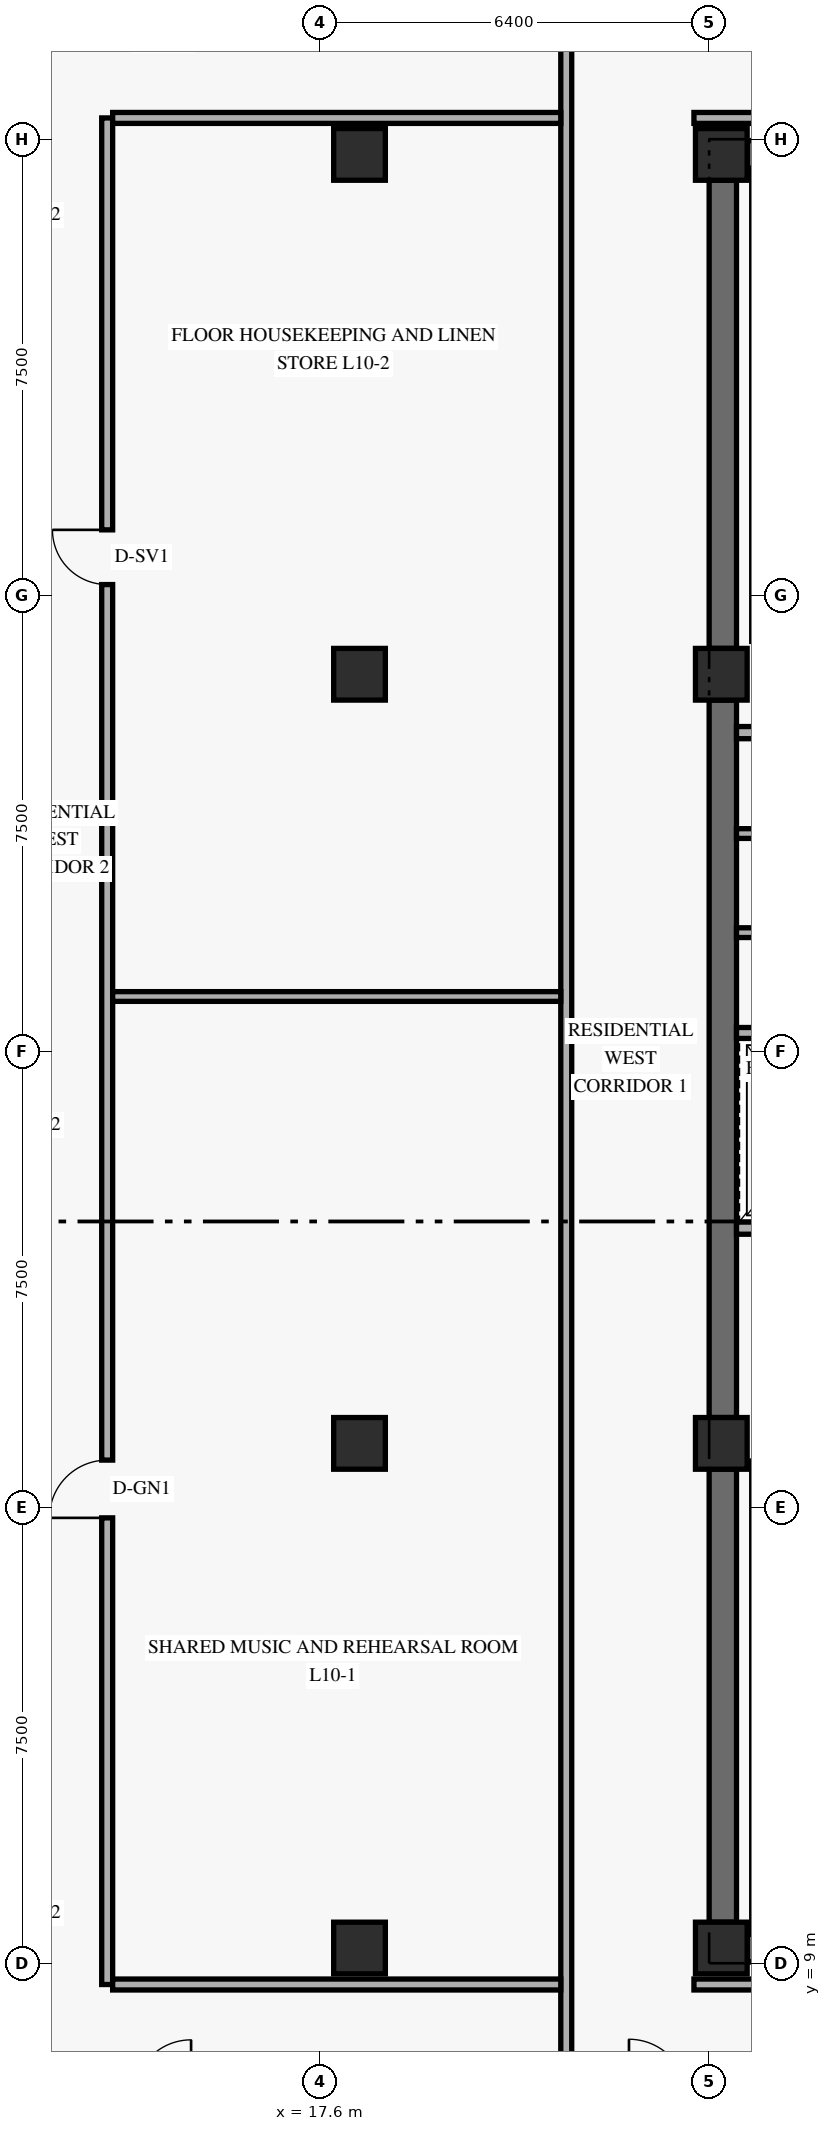
"""IFC4 building model, lengths in metres.
Left out: names, types, materials, properties, quantities, classifications, styles, units other than length and angle.
Written with IfcOpenShell. Run it as: python <this file> out.ifc"""

import sys

from ifc_helpers import new_model, si_unit, direction, frame, frame_2d, origin, origin_2d, place, context, subcontext, project, spatial, rectangle, extrude, element, fill, save


model = new_model("IFC4")
c1 = context("Model", 3, precision=1e-05, world=origin(), true_north=direction((0.0, 1.0)))
c2 = subcontext(c1, "Body", "Model", "MODEL_VIEW")
j1 = project(units=[si_unit("LENGTHUNIT", "METRE"), si_unit("PLANEANGLEUNIT", "RADIAN")], contexts=[c1])
p1 = place(None, origin())
s1 = spatial("IfcSite", under=j1, at=p1, CompositionType="ELEMENT")
p2 = place(p1, origin())
s2 = spatial("IfcBuilding", under=s1, at=p2, CompositionType="ELEMENT")
p3 = place(p2, frame((0.0, 0.0, 42.0)))
s3 = spatial("IfcBuildingStorey", under=s2, at=p3, CompositionType="ELEMENT", Elevation=42.0)
p4 = place(p3, frame((24.225, 9.675, 0.0), z_axis=(0.0, 0.0, 1.0), x_axis=(0.0, 1.0, 0.0)))
e1 = element("IfcWall", 1, at=p4, inside=s3, PredefinedType="SHEAR", context=c2, shape_type="SweptSolid", body=[
    extrude(rectangle(XDim=7.45, YDim=0.45, at=frame_2d((3.725, 0.0))), origin(), (0.0, 0.0, 1.0), 2.667),
])
p5 = place(p3, frame((24.225, 17.975, 0.0), z_axis=(0.0, 0.0, 1.0), x_axis=(0.0, 1.0, 0.0)))
e2 = element("IfcWall", 2, at=p5, inside=s3, PredefinedType="SHEAR", context=c2, shape_type="SweptSolid", body=[
    extrude(rectangle(XDim=11.8, YDim=0.45, at=frame_2d((5.9, 0.0))), origin(), (0.0, 0.0, 1.0), 2.667),
])
p6 = place(p3, frame((24.225, 30.625, 0.0), z_axis=(0.0, 0.0, 1.0), x_axis=(0.0, 1.0, 0.0)))
e3 = element("IfcWall", 3, at=p6, inside=s3, PredefinedType="SHEAR", context=c2, shape_type="SweptSolid", body=[
    extrude(rectangle(XDim=7.7, YDim=0.45, at=frame_2d((3.85, 0.0))), origin(), (0.0, 0.0, 1.0), 2.667),
])
for number, where, z_axis, x_axis in (
    (4, (24.625, 9.25, 0.0), (0.0, 0.0, 1.0), (1.0, 0.0, 0.0)),
    (5, (24.625, 38.75, 0.0), (0.0, 0.0, 1.0), (1.0, 0.0, 0.0)),
):
    element("IfcWall", number, at=place(p3, frame(where, z_axis=z_axis, x_axis=x_axis)), inside=s3, PredefinedType="SHEAR", context=c2, shape_type="SweptSolid", body=[
        extrude(rectangle(XDim=10.15, YDim=0.45, at=frame_2d((5.075, 0.0))), origin(), (0.0, 0.0, 1.0), 3.36),
    ])
for number, where, z_axis, x_axis in (
    (6, (18.25, 9.25, 0.0), (0.0, 0.0, 1.0), (1.0, 0.0, 0.0)),
    (7, (18.25, 17.55, 0.0), (0.0, 0.0, 1.0), (1.0, 0.0, 0.0)),
    (8, (18.25, 30.2, 0.0), (0.0, 0.0, 1.0), (1.0, 0.0, 0.0)),
    (9, (18.25, 38.75, 0.0), (0.0, 0.0, 1.0), (1.0, 0.0, 0.0)),
    (10, (24.2, 9.25, 0.0), (0.0, 0.0, 1.0), (1.0, 0.0, 0.0)),
    (11, (24.2, 17.55, 0.0), (0.0, 0.0, 1.0), (1.0, 0.0, 0.0)),
    (12, (24.2, 30.2, 0.0), (0.0, 0.0, 1.0), (1.0, 0.0, 0.0)),
    (13, (24.2, 38.75, 0.0), (0.0, 0.0, 1.0), (1.0, 0.0, 0.0)),
):
    element("IfcColumn", number, at=place(p3, frame(where, z_axis=z_axis, x_axis=x_axis)), inside=s3, PredefinedType="COLUMN", context=c2, shape_type="SweptSolid", body=[
        extrude(rectangle(XDim=0.85, YDim=0.85, at=origin_2d()), origin(), (0.0, 0.0, 1.0), 3.6),
    ])
p7 = place(p3, frame((24.45, 21.09, 0.0), z_axis=(0.0, 0.0, 1.0), x_axis=(1.0, 0.0, 0.0)))
e14 = element("IfcWall", 14, at=p7, inside=s3, PredefinedType="STANDARD", context=c2, shape_type="SweptSolid", body=[
    extrude(rectangle(XDim=6.83, YDim=0.2, at=frame_2d((3.415, 0.0))), origin(), (0.0, 0.0, 1.0), 3.36),
])
p8 = place(p7, frame((0.72, 0.0, 0.0)))
e15 = element("IfcOpeningElement", 15, at=p8, cuts=e14, PredefinedType="OPENING", context=c2, shape_type="SweptSolid", body=[
    extrude(rectangle(XDim=1.1, YDim=2.2, at=frame_2d((0.55, 1.1))), frame((0.0, 0.11, 0.0), z_axis=(0.0, -1.0, 0.0), x_axis=(1.0, 0.0, 0.0)), (0.0, 0.0, 1.0), 0.22),
])
p9 = place(p7, frame((3.32, 0.0, 0.0)))
e16 = element("IfcOpeningElement", 16, at=p9, cuts=e14, PredefinedType="OPENING", context=c2, shape_type="SweptSolid", body=[
    extrude(rectangle(XDim=1.1, YDim=2.2, at=frame_2d((0.55, 1.1))), frame((0.0, 0.11, 0.0), z_axis=(0.0, -1.0, 0.0), x_axis=(1.0, 0.0, 0.0)), (0.0, 0.0, 1.0), 0.22),
])
p10 = place(p3, frame((24.45, 24.3, 0.0), z_axis=(0.0, 0.0, 1.0), x_axis=(1.0, 0.0, 0.0)))
e17 = element("IfcWall", 17, at=p10, inside=s3, PredefinedType="STANDARD", context=c2, shape_type="SweptSolid", body=[
    extrude(rectangle(XDim=6.83, YDim=0.18, at=frame_2d((3.415, 0.0))), origin(), (0.0, 0.0, 1.0), 3.36),
])
p11 = place(p3, frame((24.45, 29.24, 0.0), z_axis=(0.0, 0.0, 1.0), x_axis=(1.0, 0.0, 0.0)))
e18 = element("IfcWall", 18, at=p11, inside=s3, PredefinedType="STANDARD", context=c2, shape_type="SweptSolid", body=[
    extrude(rectangle(XDim=3.65, YDim=0.2, at=frame_2d((1.825, 0.0))), origin(), (0.0, 0.0, 1.0), 3.36),
])
for number, where, z_axis, x_axis in (
    (19, (24.45, 25.95, 0.0), (0.0, 0.0, 1.0), (1.0, 0.0, 0.0)),
    (20, (24.45, 27.58, 0.0), (0.0, 0.0, 1.0), (1.0, 0.0, 0.0)),
):
    element("IfcWall", number, at=place(p3, frame(where, z_axis=z_axis, x_axis=x_axis)), inside=s3, PredefinedType="PARTITIONING", context=c2, shape_type="SweptSolid", body=[
        extrude(rectangle(XDim=3.55, YDim=0.16, at=frame_2d((1.775, 0.0))), origin(), (0.0, 0.0, 1.0), 3.36),
    ])
p12 = place(p3, frame((21.65, 6.8, 0.0), z_axis=(0.0, 0.0, 1.0), x_axis=(0.0, 1.0, 0.0)))
e21 = element("IfcWall", 21, at=p12, inside=s3, PredefinedType="STANDARD", context=c2, shape_type="SweptSolid", body=[
    extrude(rectangle(XDim=34.4, YDim=0.18, at=frame_2d((17.2, 0.0))), origin(), (0.0, 0.0, 1.0), 2.649),
])
for number, where, z_axis, x_axis in (
    (22, (23.75, 8.65, 0.0), (0.0, 0.0, 1.0), (1.0, 0.0, 0.0)),
    (23, (23.75, 39.35, 0.0), (0.0, 0.0, 1.0), (1.0, 0.0, 0.0)),
):
    element("IfcWall", number, at=place(p3, frame(where, z_axis=z_axis, x_axis=x_axis)), inside=s3, PredefinedType="STANDARD", context=c2, shape_type="SweptSolid", body=[
        extrude(rectangle(XDim=11.67, YDim=0.18, at=frame_2d((5.835, 0.0))), origin(), (0.0, 0.0, 1.0), 2.649),
    ])
p13 = place(p3, frame((14.1, 8.65, 0.0), z_axis=(0.0, 0.0, 1.0), x_axis=(0.0, 1.0, 0.0)))
e24 = element("IfcWall", 24, at=p13, inside=s3, PredefinedType="STANDARD", context=c2, shape_type="SweptSolid", body=[
    extrude(rectangle(XDim=30.7, YDim=0.18, at=frame_2d((15.35, 0.0))), origin(), (0.0, 0.0, 1.0), 2.649),
])
p14 = place(p13, frame((7.675, 0.0, 0.0)))
e25 = element("IfcOpeningElement", 25, at=p14, cuts=e24, PredefinedType="OPENING", context=c2, shape_type="SweptSolid", body=[
    extrude(rectangle(XDim=0.95, YDim=2.15, at=frame_2d((0.475, 1.075))), frame((0.0, 0.1, 0.0), z_axis=(0.0, -1.0, 0.0), x_axis=(1.0, 0.0, 0.0)), (0.0, 0.0, 1.0), 0.2),
])
p15 = place(p13, frame((23.025, 0.0, 0.0)))
e26 = element("IfcOpeningElement", 26, at=p15, cuts=e24, PredefinedType="OPENING", context=c2, shape_type="SweptSolid", body=[
    extrude(rectangle(XDim=0.9, YDim=2.1, at=frame_2d((0.45, 1.05))), frame((0.0, 0.1, 0.0), z_axis=(0.0, -1.0, 0.0), x_axis=(1.0, 0.0, 0.0)), (0.0, 0.0, 1.0), 0.2),
])
for number, where, z_axis, x_axis in (
    (27, (14.19, 8.65, 0.0), (0.0, 0.0, 1.0), (1.0, 0.0, 0.0)),
    (28, (14.19, 39.35, 0.0), (0.0, 0.0, 1.0), (1.0, 0.0, 0.0)),
):
    element("IfcWall", number, at=place(p3, frame(where, z_axis=z_axis, x_axis=x_axis)), inside=s3, PredefinedType="STANDARD", context=c2, shape_type="SweptSolid", body=[
        extrude(rectangle(XDim=7.37, YDim=0.18, at=frame_2d((3.685, 0.0))), origin(), (0.0, 0.0, 1.0), 2.649),
    ])
p16 = place(p3, frame((14.19, 24.9, 0.0), z_axis=(0.0, 0.0, 1.0), x_axis=(1.0, 0.0, 0.0)))
e29 = element("IfcWall", 29, at=p16, inside=s3, PredefinedType="PARTITIONING", context=c2, shape_type="SweptSolid", body=[
    extrude(rectangle(XDim=7.37, YDim=0.16, at=frame_2d((3.685, 0.0))), origin(), (0.0, 0.0, 1.0), 2.649),
])
p17 = place(p14, origin())
e30 = element("IfcDoor", 30, at=p17, inside=s3, OperationType="SINGLE_SWING_LEFT", PredefinedType="DOOR", context=c2, shape_type="SweptSolid", body=[
    extrude(rectangle(XDim=0.95, YDim=2.15, at=frame_2d((0.475, 1.075))), frame((0.0, 0.025, 0.0), z_axis=(0.0, -1.0, 0.0), x_axis=(1.0, 0.0, 0.0)), (0.0, 0.0, 1.0), 0.05),
])
fill(e25, e30)
p18 = place(p15, origin())
e31 = element("IfcDoor", 31, at=p18, inside=s3, OperationType="SINGLE_SWING_RIGHT", PredefinedType="DOOR", context=c2, shape_type="SweptSolid", body=[
    extrude(rectangle(XDim=0.9, YDim=2.1, at=frame_2d((0.45, 1.05))), frame((0.0, 0.025, 0.0), z_axis=(0.0, -1.0, 0.0), x_axis=(1.0, 0.0, 0.0)), (0.0, 0.0, 1.0), 0.05),
])
fill(e26, e31)
save(model, sys.argv[1])
